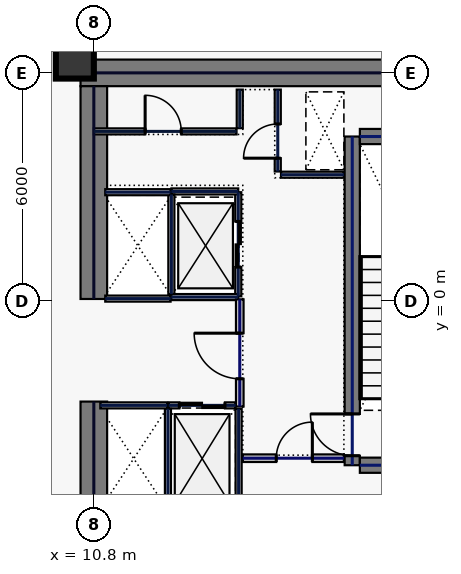
"""IFC4 building model, lengths in metres.
Left out: names, types, materials, properties, quantities, classifications, styles, units other than length and angle.
Written with IfcOpenShell. Run it as: python <this file> out.ifc"""

import sys

from ifc_helpers import new_model, si_unit, direction, frame, frame_2d, origin, origin_2d, place, context, subcontext, project, spatial, rectangle, hollow_rectangle, extrude, element, fill, save


model = new_model("IFC4")
c1 = context("Model", 3, precision=1e-05, world=origin(), true_north=direction((0.0, 1.0)))
c2 = subcontext(c1, "Body", "Model", "MODEL_VIEW")
j1 = project(units=[si_unit("LENGTHUNIT", "METRE"), si_unit("PLANEANGLEUNIT", "RADIAN")], contexts=[c1])
p1 = place(None, origin())
s1 = spatial("IfcSite", under=j1, at=p1, CompositionType="ELEMENT")
p2 = place(p1, origin())
s2 = spatial("IfcBuilding", under=s1, at=p2, CompositionType="ELEMENT")
p3 = place(p2, frame((0.0, 0.0, 117.4)))
s3 = spatial("IfcBuildingStorey", under=s2, at=p3, CompositionType="ELEMENT", Elevation=117.4)
p4 = place(p3, frame((10.45, 6.0, 0.0), z_axis=(0.0, 0.0, 1.0), x_axis=(1.0, 0.0, 0.0)))
e1 = element("IfcWall", 1, at=p4, inside=s3, PredefinedType="SHEAR", context=c2, shape_type="SweptSolid", body=[
    extrude(rectangle(XDim=11.55, YDim=0.7, at=frame_2d((5.775, 0.0))), origin(), (0.0, 0.0, 1.0), 3.74),
])
p5 = place(p3, frame((10.8, -5.65, 0.0), z_axis=(0.0, 0.0, 1.0), x_axis=(0.0, 1.0, 0.0)))
e2 = element("IfcWall", 2, at=p5, inside=s3, PredefinedType="SHEAR", context=c2, shape_type="SweptSolid", body=[
    extrude(rectangle(XDim=3.0, YDim=0.7, at=frame_2d((1.5, 0.0))), origin(), (0.0, 0.0, 1.0), 3.74),
])
p6 = place(p3, frame((10.8, 0.05, 0.0), z_axis=(0.0, 0.0, 1.0), x_axis=(0.0, 1.0, 0.0)))
e3 = element("IfcWall", 3, at=p6, inside=s3, PredefinedType="SHEAR", context=c2, shape_type="SweptSolid", body=[
    extrude(rectangle(XDim=5.6, YDim=0.7, at=frame_2d((2.8, 0.0))), origin(), (0.0, 0.0, 1.0), 3.74),
])
p7 = place(p3, frame((17.6, -4.325, 0.0), z_axis=(0.0, 0.0, 1.0), x_axis=(0.0, 1.0, 0.0)))
e4 = element("IfcWall", 4, at=p7, inside=s3, PredefinedType="SHEAR", context=c2, shape_type="SweptSolid", body=[
    extrude(rectangle(XDim=8.65, YDim=0.4, at=frame_2d((4.325, 0.0))), origin(), (0.0, 0.0, 1.0), 3.74),
])
p8 = place(p7, frame((0.25, 0.0, 0.0)))
e5 = element("IfcOpeningElement", 5, at=p8, cuts=e4, PredefinedType="OPENING", context=c2, shape_type="SweptSolid", body=[
    extrude(rectangle(XDim=1.1, YDim=2.2, at=frame_2d((0.55, 1.1))), frame((0.0, 0.21, 0.0), z_axis=(0.0, -1.0, 0.0), x_axis=(1.0, 0.0, 0.0)), (0.0, 0.0, 1.0), 0.42),
])
for number, where, z_axis, x_axis in (
    (6, (17.8, -4.325, 0.0), (0.0, 0.0, 1.0), (1.0, 0.0, 0.0)),
    (7, (17.8, 4.325, 0.0), (0.0, 0.0, 1.0), (1.0, 0.0, 0.0)),
):
    element("IfcWall", number, at=place(p3, frame(where, z_axis=z_axis, x_axis=x_axis)), inside=s3, PredefinedType="SHEAR", context=c2, shape_type="SweptSolid", body=[
        extrude(rectangle(XDim=3.4, YDim=0.4, at=frame_2d((1.7, 0.0))), origin(), (0.0, 0.0, 1.0), 3.74),
    ])
p9 = place(p3, frame((10.3, 6.35, 0.0), z_axis=(0.0, 0.0, 1.0), x_axis=(1.0, 0.0, 0.0)))
e8 = element("IfcColumn", 8, at=p9, inside=s3, PredefinedType="COLUMN", context=c2, shape_type="SweptSolid", body=[
    extrude(hollow_rectangle(XDim=1.0, YDim=1.0, WallThickness=0.045, at=origin_2d()), origin(), (0.0, 0.0, 1.0), 3.74),
])
p10 = place(p3, frame((14.6, 0.12, 0.0), z_axis=(0.0, 0.0, 1.0), x_axis=(0.0, 1.0, 0.0)))
e9 = element("IfcWall", 9, at=p10, inside=s3, PredefinedType="PARTITIONING", context=c2, shape_type="SweptSolid", body=[
    extrude(rectangle(XDim=2.74, YDim=0.16, at=frame_2d((1.37, 0.0))), origin(), (0.0, 0.0, 1.0), 3.74),
])
p11 = place(p10, frame((0.77, 0.0, 0.0)))
e10 = element("IfcOpeningElement", 10, at=p11, cuts=e9, PredefinedType="OPENING", context=c2, shape_type="SweptSolid", body=[
    extrude(rectangle(XDim=1.2, YDim=2.2, at=frame_2d((0.6, 1.1))), frame((0.0, 0.09, 0.0), z_axis=(0.0, -1.0, 0.0), x_axis=(1.0, 0.0, 0.0)), (0.0, 0.0, 1.0), 0.18),
])
for number, where, z_axis, x_axis in (
    (11, (12.84, 0.1, 0.0), (0.0, 0.0, 1.0), (1.0, 0.0, 0.0)),
    (12, (12.84, 2.88, 0.0), (0.0, 0.0, 1.0), (1.0, 0.0, 0.0)),
):
    element("IfcWall", number, at=place(p3, frame(where, z_axis=z_axis, x_axis=x_axis)), inside=s3, PredefinedType="PARTITIONING", context=c2, shape_type="SweptSolid", body=[
        extrude(rectangle(XDim=1.76, YDim=0.16, at=frame_2d((0.88, 0.0))), origin(), (0.0, 0.0, 1.0), 3.74),
    ])
p12 = place(p3, frame((12.84, 0.18, 0.0), z_axis=(0.0, 0.0, 1.0), x_axis=(0.0, 1.0, 0.0)))
e13 = element("IfcWall", 13, at=p12, inside=s3, PredefinedType="PARTITIONING", context=c2, shape_type="SweptSolid", body=[
    extrude(rectangle(XDim=2.62, YDim=0.16, at=frame_2d((1.31, 0.0))), origin(), (0.0, 0.0, 1.0), 3.74),
])
p13 = place(p3, frame((12.77, -2.75, 0.0), z_axis=(0.0, 0.0, 1.0), x_axis=(1.0, 0.0, 0.0)))
e14 = element("IfcWall", 14, at=p13, inside=s3, PredefinedType="PARTITIONING", context=c2, shape_type="SweptSolid", body=[
    extrude(rectangle(XDim=1.76, YDim=0.16, at=frame_2d((0.88, 0.0))), origin(), (0.0, 0.0, 1.0), 3.74),
])
p14 = place(p13, frame((0.28, 0.0, 0.0)))
e15 = element("IfcOpeningElement", 15, at=p14, cuts=e14, PredefinedType="OPENING", context=c2, shape_type="SweptSolid", body=[
    extrude(rectangle(XDim=1.2, YDim=2.2, at=frame_2d((0.6, 1.1))), frame((0.0, 0.09, 0.0), z_axis=(0.0, -1.0, 0.0), x_axis=(1.0, 0.0, 0.0)), (0.0, 0.0, 1.0), 0.18),
])
for number, where, z_axis, x_axis in (
    (16, (12.75, -5.54, 0.0), (0.0, 0.0, 1.0), (0.0, 1.0, 0.0)),
    (17, (14.61, -5.54, 0.0), (0.0, 0.0, 1.0), (0.0, 1.0, 0.0)),
):
    element("IfcWall", number, at=place(p3, frame(where, z_axis=z_axis, x_axis=x_axis)), inside=s3, PredefinedType="PARTITIONING", context=c2, shape_type="SweptSolid", body=[
        extrude(rectangle(XDim=2.7, YDim=0.16, at=frame_2d((1.35, 0.0))), origin(), (0.0, 0.0, 1.0), 3.74),
    ])
p15 = place(p3, frame((10.97, -2.75, 0.0), z_axis=(0.0, 0.0, 1.0), x_axis=(1.0, 0.0, 0.0)))
e18 = element("IfcWall", 18, at=p15, inside=s3, PredefinedType="PARTITIONING", context=c2, shape_type="SweptSolid", body=[
    extrude(rectangle(XDim=1.76, YDim=0.16, at=frame_2d((0.88, 0.0))), origin(), (0.0, 0.0, 1.0), 3.74),
])
for number, where, z_axis, x_axis in (
    (19, (11.1, 0.06, 0.0), (0.0, 0.0, 1.0), (1.0, 0.0, 0.0)),
    (20, (11.1, 2.86, 0.0), (0.0, 0.0, 1.0), (1.0, 0.0, 0.0)),
):
    element("IfcWall", number, at=place(p3, frame(where, z_axis=z_axis, x_axis=x_axis)), inside=s3, PredefinedType="PARTITIONING", context=c2, shape_type="SweptSolid", body=[
        extrude(rectangle(XDim=1.72, YDim=0.16, at=frame_2d((0.86, 0.0))), origin(), (0.0, 0.0, 1.0), 3.74),
    ])
p16 = place(p3, frame((15.64, 3.405, 0.0), z_axis=(0.0, 0.0, 1.0), x_axis=(0.0, 1.0, 0.0)))
e21 = element("IfcWall", 21, at=p16, inside=s3, PredefinedType="PARTITIONING", context=c2, shape_type="SweptSolid", body=[
    extrude(rectangle(XDim=2.155, YDim=0.16, at=frame_2d((1.078, 0.0))), origin(), (0.0, 0.0, 1.0), 3.74),
])
p17 = place(p16, frame((0.35, 0.0, 0.0)))
e22 = element("IfcOpeningElement", 22, at=p17, cuts=e21, PredefinedType="OPENING", context=c2, shape_type="SweptSolid", body=[
    extrude(rectangle(XDim=0.9, YDim=2.2, at=frame_2d((0.45, 1.1))), frame((0.0, 0.09, 0.0), z_axis=(0.0, -1.0, 0.0), x_axis=(1.0, 0.0, 0.0)), (0.0, 0.0, 1.0), 0.18),
])
p18 = place(p3, frame((15.725, 3.32, 0.0), z_axis=(0.0, 0.0, 1.0), x_axis=(1.0, 0.0, 0.0)))
e23 = element("IfcWall", 23, at=p18, inside=s3, PredefinedType="PARTITIONING", context=c2, shape_type="SweptSolid", body=[
    extrude(rectangle(XDim=1.655, YDim=0.16, at=frame_2d((0.827, 0.0))), origin(), (0.0, 0.0, 1.0), 3.74),
])
p19 = place(p3, frame((14.72, -4.14, 0.0), z_axis=(0.0, 0.0, 1.0), x_axis=(1.0, 0.0, 0.0)))
e24 = element("IfcWall", 24, at=p19, inside=s3, PredefinedType="SOLIDWALL", context=c2, shape_type="SweptSolid", body=[
    extrude(rectangle(XDim=2.66, YDim=0.2, at=frame_2d((1.33, 0.0))), origin(), (0.0, 0.0, 1.0), 3.74),
])
p20 = place(p19, frame((0.88, 0.0, 0.0)))
e25 = element("IfcOpeningElement", 25, at=p20, cuts=e24, PredefinedType="OPENING", context=c2, shape_type="SweptSolid", body=[
    extrude(rectangle(XDim=0.95, YDim=2.2, at=frame_2d((0.475, 1.1))), frame((0.0, 0.11, 0.0), z_axis=(0.0, -1.0, 0.0), x_axis=(1.0, 0.0, 0.0)), (0.0, 0.0, 1.0), 0.22),
])
p21 = place(p3, frame((10.8, 4.46, 0.0), z_axis=(0.0, 0.0, 1.0), x_axis=(1.0, 0.0, 0.0)))
e26 = element("IfcWall", 26, at=p21, inside=s3, PredefinedType="PARTITIONING", context=c2, shape_type="SweptSolid", body=[
    extrude(rectangle(XDim=3.755, YDim=0.16, at=frame_2d((1.877, 0.0))), origin(), (0.0, 0.0, 1.0), 3.74),
])
p22 = place(p21, frame((1.35, 0.0, 0.0)))
e27 = element("IfcOpeningElement", 27, at=p22, cuts=e26, PredefinedType="OPENING", context=c2, shape_type="SweptSolid", body=[
    extrude(rectangle(XDim=0.95, YDim=2.2, at=frame_2d((0.475, 1.1))), frame((0.0, 0.09, 0.0), z_axis=(0.0, -1.0, 0.0), x_axis=(1.0, 0.0, 0.0)), (0.0, 0.0, 1.0), 0.18),
])
p23 = place(p3, frame((14.64, 4.545, 0.0), z_axis=(0.0, 0.0, 1.0), x_axis=(0.0, 1.0, 0.0)))
e28 = element("IfcWall", 28, at=p23, inside=s3, PredefinedType="PARTITIONING", context=c2, shape_type="SweptSolid", body=[
    extrude(rectangle(XDim=1.015, YDim=0.16, at=frame_2d((0.508, 0.0))), origin(), (0.0, 0.0, 1.0), 3.74),
])
p24 = place(p3, frame((14.64, -2.78, 0.0), z_axis=(0.0, 0.0, 1.0), x_axis=(0.0, 1.0, 0.0)))
e29 = element("IfcWall", 29, at=p24, inside=s3, PredefinedType="SOLIDWALL", context=c2, shape_type="SweptSolid", body=[
    extrude(rectangle(XDim=2.82, YDim=0.2, at=frame_2d((1.41, 0.0))), origin(), (0.0, 0.0, 1.0), 3.74),
])
p25 = place(p24, frame((0.73, 0.0, 0.0)))
e30 = element("IfcOpeningElement", 30, at=p25, cuts=e29, PredefinedType="OPENING", context=c2, shape_type="SweptSolid", body=[
    extrude(rectangle(XDim=1.2, YDim=2.2, at=frame_2d((0.6, 1.1))), frame((0.0, 0.11, 0.0), z_axis=(0.0, -1.0, 0.0), x_axis=(1.0, 0.0, 0.0)), (0.0, 0.0, 1.0), 0.22),
])
p26 = place(p3, frame((10.58, 7.885, 0.0), z_axis=(0.0, 0.0, 1.0), x_axis=(0.0, -1.0, 0.0)))
e31 = element("IfcWall", 31, at=p26, inside=s3, PredefinedType="PARTITIONING", context=c2, shape_type="SweptSolid", body=[
    extrude(rectangle(XDim=1.465, YDim=0.16, at=frame_2d((0.732, 0.0))), origin(), (0.0, 0.0, 1.0), 1.535),
])
p27 = place(p8, origin())
e32 = element("IfcDoor", 32, at=p27, inside=s3, OperationType="SINGLE_SWING_RIGHT", PredefinedType="DOOR", context=c2, shape_type="SweptSolid", body=[
    extrude(rectangle(XDim=1.1, YDim=2.2, at=frame_2d((0.55, 1.1))), frame((0.0, 0.025, 0.0), z_axis=(0.0, -1.0, 0.0), x_axis=(1.0, 0.0, 0.0)), (0.0, 0.0, 1.0), 0.05),
])
fill(e5, e32)
p28 = place(p11, origin())
e33 = element("IfcDoor", 33, at=p28, inside=s3, OperationType="SLIDING_TO_LEFT", PredefinedType="DOOR", context=c2, shape_type="SweptSolid", body=[
    extrude(rectangle(XDim=1.2, YDim=2.2, at=frame_2d((0.6, 1.1))), frame((0.0, 0.025, 0.0), z_axis=(0.0, -1.0, 0.0), x_axis=(1.0, 0.0, 0.0)), (0.0, 0.0, 1.0), 0.05),
])
fill(e10, e33)
p29 = place(p14, origin())
e34 = element("IfcDoor", 34, at=p29, inside=s3, OperationType="SLIDING_TO_LEFT", PredefinedType="DOOR", context=c2, shape_type="SweptSolid", body=[
    extrude(rectangle(XDim=1.2, YDim=2.2, at=frame_2d((0.6, 1.1))), frame((0.0, 0.025, 0.0), z_axis=(0.0, -1.0, 0.0), x_axis=(1.0, 0.0, 0.0)), (0.0, 0.0, 1.0), 0.05),
])
fill(e15, e34)
p30 = place(p17, origin())
e35 = element("IfcDoor", 35, at=p30, inside=s3, OperationType="SINGLE_SWING_LEFT", PredefinedType="DOOR", context=c2, shape_type="SweptSolid", body=[
    extrude(rectangle(XDim=0.9, YDim=2.2, at=frame_2d((0.45, 1.1))), frame((0.0, 0.025, 0.0), z_axis=(0.0, -1.0, 0.0), x_axis=(1.0, 0.0, 0.0)), (0.0, 0.0, 1.0), 0.05),
])
fill(e22, e35)
p31 = place(p20, origin())
e36 = element("IfcDoor", 36, at=p31, inside=s3, OperationType="SINGLE_SWING_RIGHT", PredefinedType="DOOR", context=c2, shape_type="SweptSolid", body=[
    extrude(rectangle(XDim=0.95, YDim=2.2, at=frame_2d((0.475, 1.1))), frame((0.0, 0.025, 0.0), z_axis=(0.0, -1.0, 0.0), x_axis=(1.0, 0.0, 0.0)), (0.0, 0.0, 1.0), 0.05),
])
fill(e25, e36)
p32 = place(p22, origin())
e37 = element("IfcDoor", 37, at=p32, inside=s3, OperationType="SINGLE_SWING_LEFT", PredefinedType="DOOR", context=c2, shape_type="SweptSolid", body=[
    extrude(rectangle(XDim=0.95, YDim=2.2, at=frame_2d((0.475, 1.1))), frame((0.0, 0.025, 0.0), z_axis=(0.0, -1.0, 0.0), x_axis=(1.0, 0.0, 0.0)), (0.0, 0.0, 1.0), 0.05),
])
fill(e27, e37)
p33 = place(p25, origin())
e38 = element("IfcDoor", 38, at=p33, inside=s3, OperationType="SINGLE_SWING_RIGHT", PredefinedType="DOOR", context=c2, shape_type="SweptSolid", body=[
    extrude(rectangle(XDim=1.2, YDim=2.2, at=frame_2d((0.6, 1.1))), frame((0.0, 0.025, 0.0), z_axis=(0.0, -1.0, 0.0), x_axis=(1.0, 0.0, 0.0)), (0.0, 0.0, 1.0), 0.05),
])
fill(e30, e38)
save(model, sys.argv[1])
